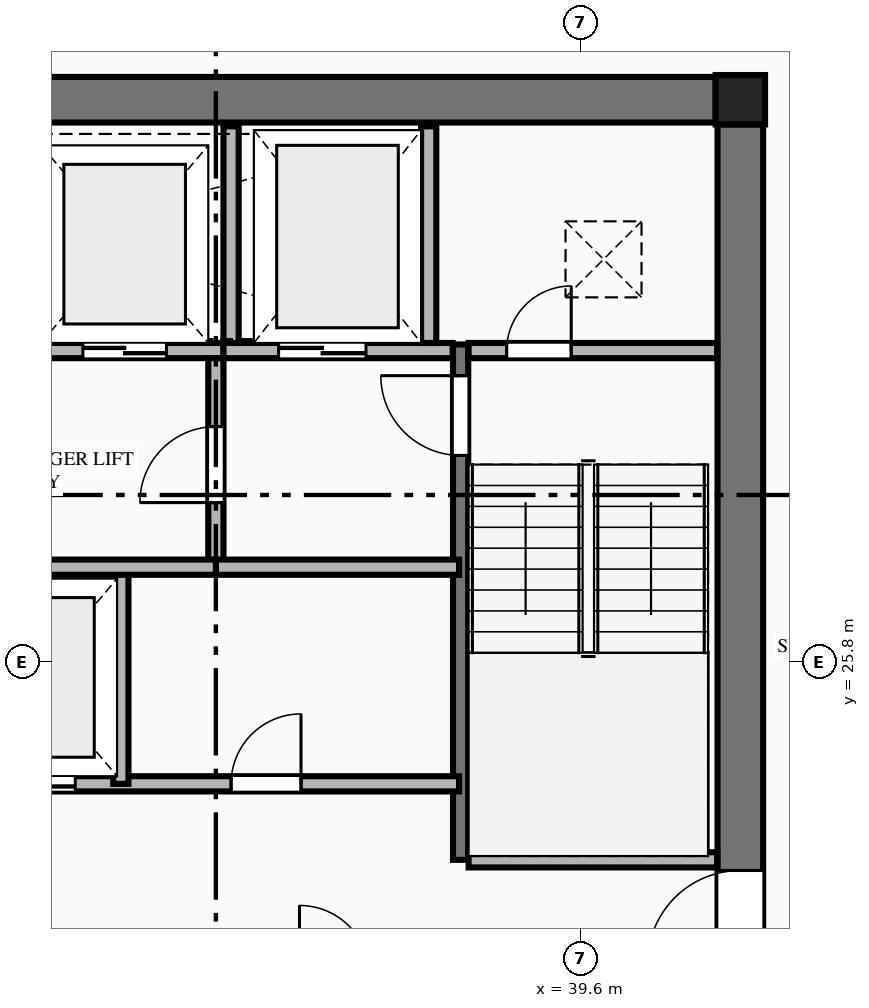
"""IFC4 building model, lengths in metres.
Left out: names, types, materials, properties, quantities, classifications, styles, units other than length and angle.
Written with IfcOpenShell. Run it as: python <this file> out.ifc"""

import sys

from ifc_helpers import new_model, si_unit, direction, frame, frame_2d, origin, origin_2d, place, context, subcontext, project, spatial, rectangle, extrude, element, fill, save


model = new_model("IFC4")
c1 = context("Model", 3, precision=1e-05, world=origin(), true_north=direction((0.0, 1.0)))
c2 = subcontext(c1, "Body", "Model", "MODEL_VIEW")
j1 = project(units=[si_unit("LENGTHUNIT", "METRE"), si_unit("PLANEANGLEUNIT", "RADIAN")], contexts=[c1])
p1 = place(None, origin())
s1 = spatial("IfcSite", under=j1, at=p1, CompositionType="ELEMENT")
p2 = place(p1, origin())
s2 = spatial("IfcBuilding", under=s1, at=p2, CompositionType="ELEMENT")
p3 = place(p2, frame((0.0, 0.0, 186.1)))
s3 = spatial("IfcBuildingStorey", under=s2, at=p3, CompositionType="ELEMENT", Elevation=186.1)
p4 = place(p3, frame((41.7, 33.2, 0.0), z_axis=(0.0, 0.0, 1.0), x_axis=(1.0, 0.0, 0.0)))
e1 = element("IfcColumn", 1, at=p4, inside=s3, PredefinedType="COLUMN", context=c2, shape_type="SweptSolid", body=[
    extrude(rectangle(XDim=0.65, YDim=0.65, at=origin_2d()), origin(), (0.0, 0.0, 1.0), 3.55),
])
p5 = place(p3, frame((23.425, 33.2, 0.0), z_axis=(0.0, 0.0, 1.0), x_axis=(1.0, 0.0, 0.0)))
e2 = element("IfcWall", 2, at=p5, inside=s3, PredefinedType="SHEAR", context=c2, shape_type="SweptSolid", body=[
    extrude(rectangle(XDim=17.95, YDim=0.6, at=frame_2d((8.975, 0.0))), origin(), (0.0, 0.0, 1.0), 3.35),
])
p6 = place(p3, frame((41.7, 18.925, 0.0), z_axis=(0.0, 0.0, 1.0), x_axis=(0.0, 1.0, 0.0)))
e3 = element("IfcWall", 3, at=p6, inside=s3, PredefinedType="SHEAR", context=c2, shape_type="SweptSolid", body=[
    extrude(rectangle(XDim=13.95, YDim=0.6, at=frame_2d((6.975, 0.0))), origin(), (0.0, 0.0, 1.0), 3.35),
])
p7 = place(p6, frame((2.915, 0.0, 0.0)))
e4 = element("IfcOpeningElement", 4, at=p7, cuts=e3, PredefinedType="OPENING", context=c2, shape_type="SweptSolid", body=[
    extrude(rectangle(XDim=1.22, YDim=2.25, at=frame_2d((0.61, 1.125))), frame((0.0, 0.31, 0.0), z_axis=(0.0, -1.0, 0.0), x_axis=(1.0, 0.0, 0.0)), (0.0, 0.0, 1.0), 0.62),
])
p8 = place(p3, frame((38.02, 23.2, 0.0), z_axis=(0.0, 0.0, 1.0), x_axis=(0.0, 1.0, 0.0)))
e5 = element("IfcWall", 5, at=p8, inside=s3, PredefinedType="SHEAR", context=c2, shape_type="SweptSolid", body=[
    extrude(rectangle(XDim=6.78, YDim=0.2, at=frame_2d((3.39, 0.0))), origin(), (0.0, 0.0, 1.0), 3.55),
])
p9 = place(p8, frame((5.32, 0.0, 0.0)))
e6 = element("IfcOpeningElement", 6, at=p9, cuts=e5, PredefinedType="OPENING", context=c2, shape_type="SweptSolid", body=[
    extrude(rectangle(XDim=1.05, YDim=2.15, at=frame_2d((0.525, 1.075))), frame((0.0, 0.11, 0.0), z_axis=(0.0, -1.0, 0.0), x_axis=(1.0, 0.0, 0.0)), (0.0, 0.0, 1.0), 0.22),
])
p10 = place(p3, frame((38.125, 23.2, 0.0), z_axis=(0.0, 0.0, 1.0), x_axis=(1.0, 0.0, 0.0)))
e7 = element("IfcWall", 7, at=p10, inside=s3, PredefinedType="PLUMBINGWALL", context=c2, shape_type="SweptSolid", body=[
    extrude(rectangle(XDim=3.27, YDim=0.2, at=frame_2d((1.635, 0.0))), origin(), (0.0, 0.0, 1.0), 3.35),
])
p11 = place(p3, frame((29.9, 29.9, 0.0), z_axis=(0.0, 0.0, 1.0), x_axis=(1.0, 0.0, 0.0)))
e8 = element("IfcWall", 8, at=p11, inside=s3, PredefinedType="PLUMBINGWALL", context=c2, shape_type="SweptSolid", body=[
    extrude(rectangle(XDim=5.0, YDim=0.2, at=frame_2d((2.5, 0.0))), origin(), (0.0, 0.0, 1.0), 3.35),
])
p12 = place(p11, frame((0.75, 0.0, 0.0)))
e9 = element("IfcOpeningElement", 9, at=p12, cuts=e8, PredefinedType="OPENING", context=c2, shape_type="SweptSolid", body=[
    extrude(rectangle(XDim=1.1, YDim=2.2, at=frame_2d((0.55, 1.1))), frame((0.0, 0.11, 0.0), z_axis=(0.0, -1.0, 0.0), x_axis=(1.0, 0.0, 0.0)), (0.0, 0.0, 1.0), 0.22),
])
p13 = place(p11, frame((3.15, 0.0, 0.0)))
e10 = element("IfcOpeningElement", 10, at=p13, cuts=e8, PredefinedType="OPENING", context=c2, shape_type="SweptSolid", body=[
    extrude(rectangle(XDim=1.1, YDim=2.2, at=frame_2d((0.55, 1.1))), frame((0.0, 0.11, 0.0), z_axis=(0.0, -1.0, 0.0), x_axis=(1.0, 0.0, 0.0)), (0.0, 0.0, 1.0), 0.22),
])
p14 = place(p3, frame((34.9, 29.9, 0.0), z_axis=(0.0, 0.0, 1.0), x_axis=(1.0, 0.0, 0.0)))
e11 = element("IfcWall", 11, at=p14, inside=s3, PredefinedType="PLUMBINGWALL", context=c2, shape_type="SweptSolid", body=[
    extrude(rectangle(XDim=3.015, YDim=0.2, at=frame_2d((1.508, 0.0))), origin(), (0.0, 0.0, 1.0), 3.35),
])
p15 = place(p14, frame((0.725, 0.0, 0.0)))
e12 = element("IfcOpeningElement", 12, at=p15, cuts=e11, PredefinedType="OPENING", context=c2, shape_type="SweptSolid", body=[
    extrude(rectangle(XDim=1.15, YDim=2.2, at=frame_2d((0.575, 1.1))), frame((0.0, 0.11, 0.0), z_axis=(0.0, -1.0, 0.0), x_axis=(1.0, 0.0, 0.0)), (0.0, 0.0, 1.0), 0.22),
])
p16 = place(p3, frame((38.125, 29.9, 0.0), z_axis=(0.0, 0.0, 1.0), x_axis=(1.0, 0.0, 0.0)))
e13 = element("IfcWall", 13, at=p16, inside=s3, PredefinedType="PLUMBINGWALL", context=c2, shape_type="SweptSolid", body=[
    extrude(rectangle(XDim=3.27, YDim=0.2, at=frame_2d((1.635, 0.0))), origin(), (0.0, 0.0, 1.0), 3.35),
])
p17 = place(p16, frame((0.5, 0.0, 0.0)))
e14 = element("IfcOpeningElement", 14, at=p17, cuts=e13, PredefinedType="OPENING", context=c2, shape_type="SweptSolid", body=[
    extrude(rectangle(XDim=0.85, YDim=2.05, at=frame_2d((0.425, 1.025))), frame((0.0, 0.11, 0.0), z_axis=(0.0, -1.0, 0.0), x_axis=(1.0, 0.0, 0.0)), (0.0, 0.0, 1.0), 0.22),
])
for number, where, z_axis, x_axis in (
    (15, (35.0, 30.0, 0.0), (0.0, 0.0, 1.0), (0.0, 1.0, 0.0)),
    (16, (37.6, 30.0, 0.0), (0.0, 0.0, 1.0), (0.0, 1.0, 0.0)),
):
    element("IfcWall", number, at=place(p3, frame(where, z_axis=z_axis, x_axis=x_axis)), inside=s3, PredefinedType="PLUMBINGWALL", context=c2, shape_type="SweptSolid", body=[
        extrude(rectangle(XDim=2.85, YDim=0.2, at=frame_2d((1.425, 0.0))), origin(), (0.0, 0.0, 1.0), 3.35),
    ])
p18 = place(p3, frame((34.8, 27.05, 0.0), z_axis=(0.0, 0.0, 1.0), x_axis=(0.0, 1.0, 0.0)))
e17 = element("IfcWall", 17, at=p18, inside=s3, PredefinedType="PLUMBINGWALL", context=c2, shape_type="SweptSolid", body=[
    extrude(rectangle(XDim=2.75, YDim=0.2, at=frame_2d((1.375, 0.0))), origin(), (0.0, 0.0, 1.0), 3.35),
])
p19 = place(p18, frame((0.85, 0.0, 0.0)))
e18 = element("IfcOpeningElement", 18, at=p19, cuts=e17, PredefinedType="OPENING", context=c2, shape_type="SweptSolid", body=[
    extrude(rectangle(XDim=1.0, YDim=2.15, at=frame_2d((0.5, 1.075))), frame((0.0, 0.11, 0.0), z_axis=(0.0, -1.0, 0.0), x_axis=(1.0, 0.0, 0.0)), (0.0, 0.0, 1.0), 0.22),
])
p20 = place(p3, frame((34.8, 27.05, 0.0), z_axis=(0.0, 0.0, 1.0), x_axis=(1.0, 0.0, 0.0)))
e19 = element("IfcWall", 19, at=p20, inside=s3, PredefinedType="PLUMBINGWALL", context=c2, shape_type="SweptSolid", body=[
    extrude(rectangle(XDim=3.2, YDim=0.2, at=frame_2d((1.6, 0.0))), origin(), (0.0, 0.0, 1.0), 3.35),
])
p21 = place(p3, frame((31.2, 24.2, 0.0), z_axis=(0.0, 0.0, 1.0), x_axis=(1.0, 0.0, 0.0)))
e20 = element("IfcWall", 20, at=p21, inside=s3, PredefinedType="PLUMBINGWALL", context=c2, shape_type="SweptSolid", body=[
    extrude(rectangle(XDim=6.8, YDim=0.2, at=frame_2d((3.4, 0.0))), origin(), (0.0, 0.0, 1.0), 3.35),
])
p22 = place(p21, frame((0.65, 0.0, 0.0)))
e21 = element("IfcOpeningElement", 21, at=p22, cuts=e20, PredefinedType="OPENING", context=c2, shape_type="SweptSolid", body=[
    extrude(rectangle(XDim=1.1, YDim=2.2, at=frame_2d((0.55, 1.1))), frame((0.0, 0.11, 0.0), z_axis=(0.0, -1.0, 0.0), x_axis=(1.0, 0.0, 0.0)), (0.0, 0.0, 1.0), 0.22),
])
p23 = place(p21, frame((3.8, 0.0, 0.0)))
e22 = element("IfcOpeningElement", 22, at=p23, cuts=e20, PredefinedType="OPENING", context=c2, shape_type="SweptSolid", body=[
    extrude(rectangle(XDim=0.92, YDim=2.15, at=frame_2d((0.46, 1.075))), frame((0.0, 0.11, 0.0), z_axis=(0.0, -1.0, 0.0), x_axis=(1.0, 0.0, 0.0)), (0.0, 0.0, 1.0), 0.22),
])
p24 = place(p3, frame((33.55, 24.2, 0.0), z_axis=(0.0, 0.0, 1.0), x_axis=(0.0, 1.0, 0.0)))
e23 = element("IfcWall", 23, at=p24, inside=s3, PredefinedType="PLUMBINGWALL", context=c2, shape_type="SweptSolid", body=[
    extrude(rectangle(XDim=2.85, YDim=0.2, at=frame_2d((1.425, 0.0))), origin(), (0.0, 0.0, 1.0), 3.35),
])
p25 = place(p3, frame((31.25, 27.05, 0.0), z_axis=(0.0, 0.0, 1.0), x_axis=(1.0, 0.0, 0.0)))
e24 = element("IfcWall", 24, at=p25, inside=s3, PredefinedType="PLUMBINGWALL", context=c2, shape_type="SweptSolid", body=[
    extrude(rectangle(XDim=3.55, YDim=0.2, at=frame_2d((1.775, 0.0))), origin(), (0.0, 0.0, 1.0), 3.35),
])
p26 = place(p7, origin())
e25 = element("IfcDoor", 25, at=p26, inside=s3, OperationType="SINGLE_SWING_LEFT", PredefinedType="DOOR", context=c2, shape_type="SweptSolid", body=[
    extrude(rectangle(XDim=1.22, YDim=2.25, at=frame_2d((0.61, 1.125))), frame((0.0, 0.025, 0.0), z_axis=(0.0, -1.0, 0.0), x_axis=(1.0, 0.0, 0.0)), (0.0, 0.0, 1.0), 0.05),
])
fill(e4, e25)
p27 = place(p9, origin())
e26 = element("IfcDoor", 26, at=p27, inside=s3, OperationType="SINGLE_SWING_RIGHT", PredefinedType="DOOR", context=c2, shape_type="SweptSolid", body=[
    extrude(rectangle(XDim=1.05, YDim=2.15, at=frame_2d((0.525, 1.075))), frame((0.0, 0.025, 0.0), z_axis=(0.0, -1.0, 0.0), x_axis=(1.0, 0.0, 0.0)), (0.0, 0.0, 1.0), 0.05),
])
fill(e6, e26)
p28 = place(p17, origin())
e27 = element("IfcDoor", 27, at=p28, inside=s3, OperationType="SINGLE_SWING_RIGHT", PredefinedType="DOOR", context=c2, shape_type="SweptSolid", body=[
    extrude(rectangle(XDim=0.85, YDim=2.05, at=frame_2d((0.425, 1.025))), frame((0.0, 0.025, 0.0), z_axis=(0.0, -1.0, 0.0), x_axis=(1.0, 0.0, 0.0)), (0.0, 0.0, 1.0), 0.05),
])
fill(e14, e27)
p29 = place(p15, origin())
e28 = element("IfcDoor", 28, at=p29, inside=s3, OperationType="DOUBLE_DOOR_SLIDING", PredefinedType="DOOR", context=c2, shape_type="SweptSolid", body=[
    extrude(rectangle(XDim=1.15, YDim=2.2, at=frame_2d((0.575, 1.1))), frame((0.0, 0.025, 0.0), z_axis=(0.0, -1.0, 0.0), x_axis=(1.0, 0.0, 0.0)), (0.0, 0.0, 1.0), 0.05),
])
fill(e12, e28)
p30 = place(p13, origin())
e29 = element("IfcDoor", 29, at=p30, inside=s3, OperationType="DOUBLE_DOOR_SLIDING", PredefinedType="DOOR", context=c2, shape_type="SweptSolid", body=[
    extrude(rectangle(XDim=1.1, YDim=2.2, at=frame_2d((0.55, 1.1))), frame((0.0, 0.025, 0.0), z_axis=(0.0, -1.0, 0.0), x_axis=(1.0, 0.0, 0.0)), (0.0, 0.0, 1.0), 0.05),
])
fill(e10, e29)
p31 = place(p19, origin())
e30 = element("IfcDoor", 30, at=p31, inside=s3, OperationType="SINGLE_SWING_LEFT", PredefinedType="DOOR", context=c2, shape_type="SweptSolid", body=[
    extrude(rectangle(XDim=1.0, YDim=2.15, at=frame_2d((0.5, 1.075))), frame((0.0, 0.025, 0.0), z_axis=(0.0, -1.0, 0.0), x_axis=(1.0, 0.0, 0.0)), (0.0, 0.0, 1.0), 0.05),
])
fill(e18, e30)
p32 = place(p22, origin())
e31 = element("IfcDoor", 31, at=p32, inside=s3, OperationType="DOUBLE_DOOR_SLIDING", PredefinedType="DOOR", context=c2, shape_type="SweptSolid", body=[
    extrude(rectangle(XDim=1.1, YDim=2.2, at=frame_2d((0.55, 1.1))), frame((0.0, 0.025, 0.0), z_axis=(0.0, -1.0, 0.0), x_axis=(1.0, 0.0, 0.0)), (0.0, 0.0, 1.0), 0.05),
])
fill(e21, e31)
p33 = place(p23, origin())
e32 = element("IfcDoor", 32, at=p33, inside=s3, OperationType="SINGLE_SWING_RIGHT", PredefinedType="DOOR", context=c2, shape_type="SweptSolid", body=[
    extrude(rectangle(XDim=0.92, YDim=2.15, at=frame_2d((0.46, 1.075))), frame((0.0, 0.025, 0.0), z_axis=(0.0, -1.0, 0.0), x_axis=(1.0, 0.0, 0.0)), (0.0, 0.0, 1.0), 0.05),
])
fill(e22, e32)
save(model, sys.argv[1])
